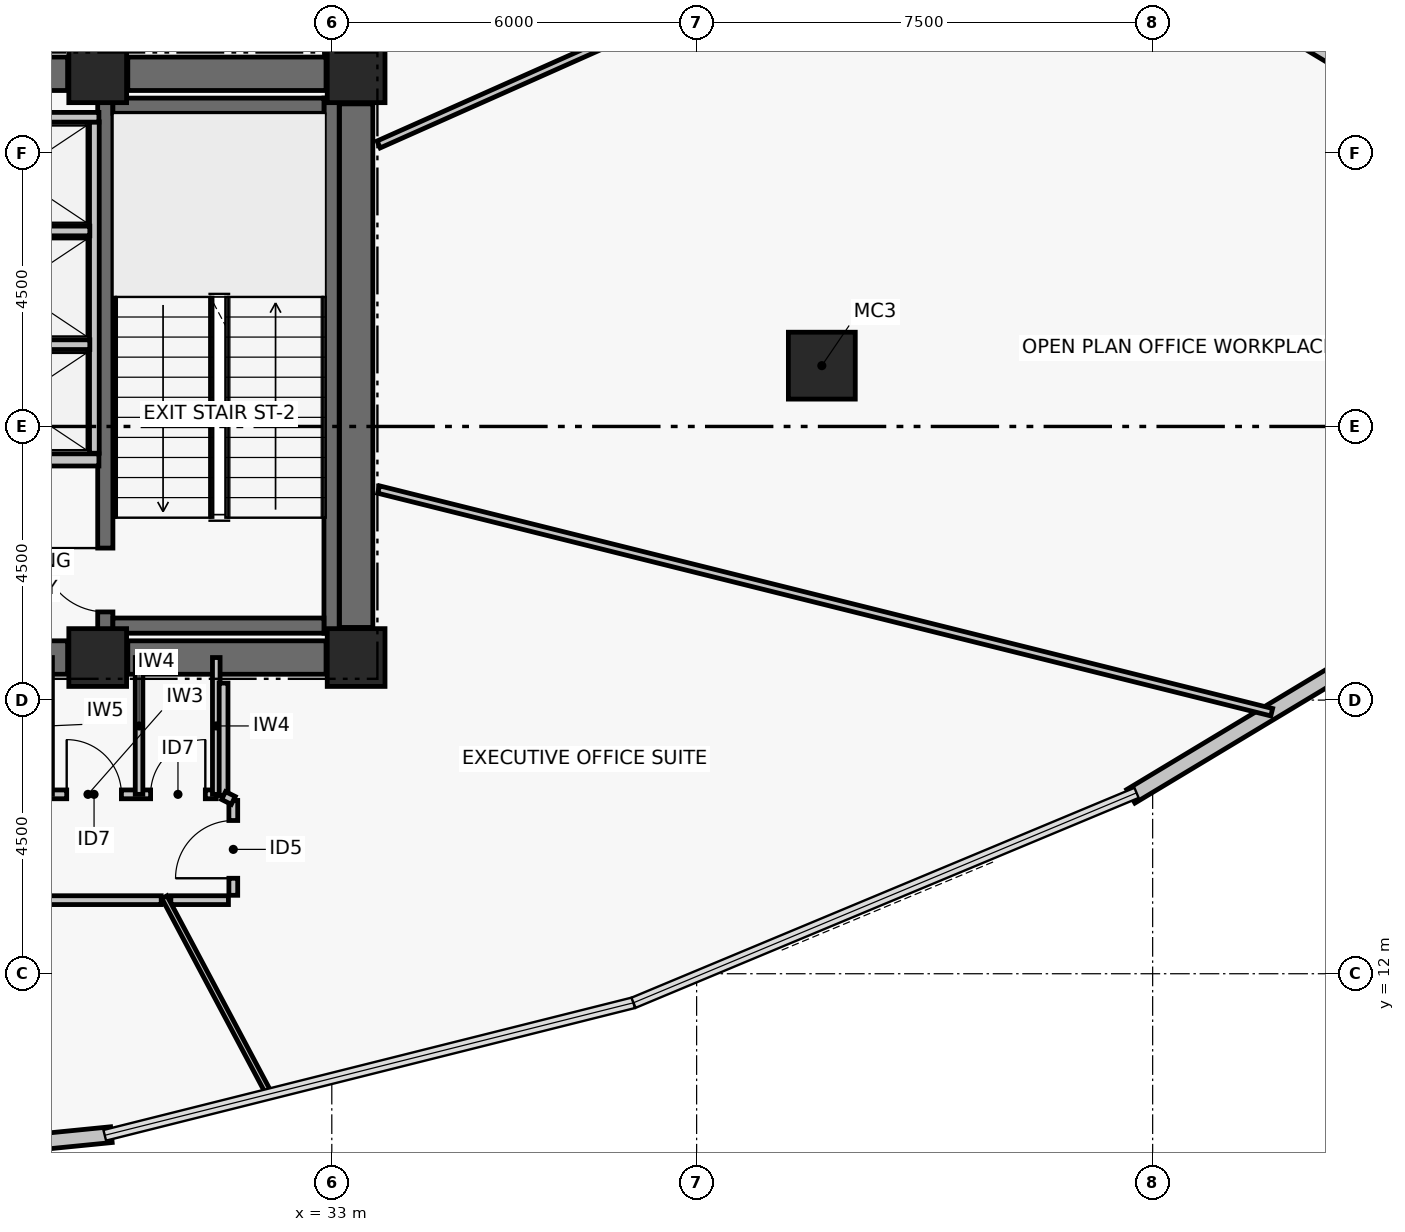
"""IFC4 building model, lengths in metres.
Left out: names, types, materials, properties, quantities, classifications, styles, units other than length and angle.
Written with IfcOpenShell. Run it as: python <this file> out.ifc"""

import sys

from ifc_helpers import new_model, si_unit, direction, frame, frame_2d, origin, origin_2d, place, context, subcontext, project, spatial, rectangle, hollow_rectangle, extrude, element, fill, save


model = new_model("IFC4")
c1 = context("Model", 3, precision=1e-05, world=origin(), true_north=direction((0.0, 1.0)))
c2 = subcontext(c1, "Body", "Model", "MODEL_VIEW")
j1 = project(units=[si_unit("LENGTHUNIT", "METRE"), si_unit("PLANEANGLEUNIT", "RADIAN")], contexts=[c1])
p1 = place(None, origin())
s1 = spatial("IfcSite", under=j1, at=p1, CompositionType="ELEMENT")
p2 = place(p1, origin())
s2 = spatial("IfcBuilding", under=s1, at=p2, CompositionType="ELEMENT")
p3 = place(p2, frame((0.0, 0.0, 158.04)))
s3 = spatial("IfcBuildingStorey", under=s2, at=p3, CompositionType="ELEMENT", Elevation=158.04)
for number, where, z_axis, x_axis in (
    (1, (29.15, 17.2, 0.0), (0.0, 0.0, 1.0), (1.0, 0.0, 0.0)),
    (2, (33.4, 17.2, 0.0), (0.0, 0.0, 1.0), (1.0, 0.0, 0.0)),
    (3, (29.15, 26.8, 0.0), (0.0, 0.0, 1.0), (1.0, 0.0, 0.0)),
    (4, (33.4, 26.8, 0.0), (0.0, 0.0, 1.0), (1.0, 0.0, 0.0)),
):
    element("IfcColumn", number, at=place(p3, frame(where, z_axis=z_axis, x_axis=x_axis)), inside=s3, PredefinedType="COLUMN", context=c2, shape_type="SweptSolid", body=[
        extrude(rectangle(XDim=0.95, YDim=0.95, at=origin_2d()), origin(), (0.0, 0.0, 1.0), 3.72),
    ])
p4 = place(p3, frame((26.85, 17.2, 0.0), z_axis=(0.0, 0.0, 1.0), x_axis=(1.0, 0.0, 0.0)))
e5 = element("IfcWall", 5, at=p4, inside=s3, PredefinedType="SHEAR", context=c2, shape_type="SweptSolid", body=[
    extrude(rectangle(XDim=1.805, YDim=0.55, at=frame_2d((0.902, 0.0))), origin(), (0.0, 0.0, 1.0), 3.5),
])
p5 = place(p3, frame((29.645, 17.2, 0.0), z_axis=(0.0, 0.0, 1.0), x_axis=(1.0, 0.0, 0.0)))
e6 = element("IfcWall", 6, at=p5, inside=s3, PredefinedType="SHEAR", context=c2, shape_type="SweptSolid", body=[
    extrude(rectangle(XDim=3.26, YDim=0.55, at=frame_2d((1.63, 0.0))), origin(), (0.0, 0.0, 1.0), 3.5),
])
p6 = place(p3, frame((26.85, 26.8, 0.0), z_axis=(0.0, 0.0, 1.0), x_axis=(1.0, 0.0, 0.0)))
e7 = element("IfcWall", 7, at=p6, inside=s3, PredefinedType="SHEAR", context=c2, shape_type="SweptSolid", body=[
    extrude(rectangle(XDim=1.805, YDim=0.55, at=frame_2d((0.902, 0.0))), origin(), (0.0, 0.0, 1.0), 3.5),
])
p7 = place(p3, frame((29.645, 26.8, 0.0), z_axis=(0.0, 0.0, 1.0), x_axis=(1.0, 0.0, 0.0)))
e8 = element("IfcWall", 8, at=p7, inside=s3, PredefinedType="SHEAR", context=c2, shape_type="SweptSolid", body=[
    extrude(rectangle(XDim=3.26, YDim=0.55, at=frame_2d((1.63, 0.0))), origin(), (0.0, 0.0, 1.0), 3.5),
])
p8 = place(p3, frame((33.4, 17.695, 0.0), z_axis=(0.0, 0.0, 1.0), x_axis=(0.0, 1.0, 0.0)))
e9 = element("IfcWall", 9, at=p8, inside=s3, PredefinedType="SHEAR", context=c2, shape_type="SweptSolid", body=[
    extrude(rectangle(XDim=8.61, YDim=0.55, at=frame_2d((4.305, 0.0))), origin(), (0.0, 0.0, 1.0), 3.5),
])
p9 = place(p3, frame((29.275, 17.6, 0.0), z_axis=(0.0, 0.0, 1.0), x_axis=(0.0, 1.0, 0.0)))
e10 = element("IfcWall", 10, at=p9, inside=s3, PredefinedType="SHEAR", context=c2, shape_type="SweptSolid", body=[
    extrude(rectangle(XDim=8.8, YDim=0.25, at=frame_2d((4.4, 0.0))), origin(), (0.0, 0.0, 1.0), 3.5),
])
p10 = place(p9, frame((0.35, 0.0, 0.0)))
e11 = element("IfcOpeningElement", 11, at=p10, cuts=e10, PredefinedType="OPENING", context=c2, shape_type="SweptSolid", body=[
    extrude(rectangle(XDim=1.05, YDim=2.08, at=frame_2d((0.525, 1.04))), frame((0.0, 0.135, 0.0), z_axis=(0.0, -1.0, 0.0), x_axis=(1.0, 0.0, 0.0)), (0.0, 0.0, 1.0), 0.27),
])
p11 = place(p3, frame((32.996, 17.6, 0.0), z_axis=(0.0, 0.0, 1.0), x_axis=(0.0, 1.0, 0.0)))
e12 = element("IfcWall", 12, at=p11, inside=s3, PredefinedType="SHEAR", context=c2, shape_type="SweptSolid", body=[
    extrude(rectangle(XDim=8.8, YDim=0.25, at=frame_2d((4.4, 0.0))), origin(), (0.0, 0.0, 1.0), 3.5),
])
for number, where, z_axis, x_axis in (
    (13, (29.4, 17.725, 0.0), (0.0, 0.0, 1.0), (1.0, 0.0, 0.0)),
    (14, (29.4, 26.275, 0.0), (0.0, 0.0, 1.0), (1.0, 0.0, 0.0)),
):
    element("IfcWall", number, at=place(p3, frame(where, z_axis=z_axis, x_axis=x_axis)), inside=s3, PredefinedType="SHEAR", context=c2, shape_type="SweptSolid", body=[
        extrude(rectangle(XDim=3.471, YDim=0.25, at=frame_2d((1.736, 0.0))), origin(), (0.0, 0.0, 1.0), 3.5),
    ])
p12 = place(p3, frame((41.059, 22.0, 0.0), z_axis=(0.0, 0.0, 1.0), x_axis=(1.0, 0.0, 0.0)))
e15 = element("IfcColumn", 15, at=p12, inside=s3, PredefinedType="COLUMN", context=c2, shape_type="SweptSolid", body=[
    extrude(hollow_rectangle(XDim=1.1, YDim=1.1, WallThickness=0.045, at=origin_2d()), origin(), (0.0, 0.0, 1.0), 3.72),
])
p13 = place(p3, frame((46.141, 29.082, 0.0), z_axis=(0.0, 0.0, 1.0), x_axis=(0.856788694159, -0.515667658053, 0.0)))
e16 = element("IfcWall", 16, at=p13, inside=s3, PredefinedType="PARTITIONING", context=c2, shape_type="SweptSolid", body=[
    extrude(rectangle(XDim=9.279, YDim=0.26, at=frame_2d((4.64, 0.0))), origin(), (0.0, 0.0, 1.0), 3.5),
])
p14 = place(p3, frame((29.375, 9.354, 0.0), z_axis=(0.0, 0.0, 1.0), x_axis=(-0.9950896707, -0.098977508888, 0.0)))
e17 = element("IfcWall", 17, at=p14, inside=s3, PredefinedType="PARTITIONING", context=c2, shape_type="SweptSolid", body=[
    extrude(rectangle(XDim=9.28, YDim=0.26, at=frame_2d((4.64, 0.0))), origin(), (0.0, 0.0, 1.0), 3.5),
])
p15 = place(p3, frame((54.091, 19.703, 0.0), z_axis=(0.0, 0.0, 1.0), x_axis=(-0.856788694159, -0.515667658053, 0.0)))
e18 = element("IfcWall", 18, at=p15, inside=s3, PredefinedType="PARTITIONING", context=c2, shape_type="SweptSolid", body=[
    extrude(rectangle(XDim=9.279, YDim=0.26, at=frame_2d((4.64, 0.0))), origin(), (0.0, 0.0, 1.0), 3.5),
])
p16 = place(p3, frame((26.37, 20.45, 0.0), z_axis=(0.0, 0.0, 1.0), x_axis=(1.0, 0.0, 0.0)))
e19 = element("IfcWall", 19, at=p16, inside=s3, PredefinedType="PARTITIONING", context=c2, shape_type="SweptSolid", body=[
    extrude(rectangle(XDim=2.8, YDim=0.2, at=frame_2d((1.4, 0.0))), origin(), (0.0, 0.0, 1.0), 3.5),
])
p17 = place(p16, frame((0.78, 0.0, 0.0)))
e20 = element("IfcOpeningElement", 20, at=p17, cuts=e19, PredefinedType="OPENING", context=c2, shape_type="SweptSolid", body=[
    extrude(rectangle(XDim=1.1, YDim=2.08, at=frame_2d((0.55, 1.04))), frame((0.0, 0.11, 0.0), z_axis=(0.0, -1.0, 0.0), x_axis=(1.0, 0.0, 0.0)), (0.0, 0.0, 1.0), 0.22),
])
p18 = place(p3, frame((29.095, 20.56, 0.0), z_axis=(0.0, 0.0, 1.0), x_axis=(0.0, 1.0, 0.0)))
e21 = element("IfcWall", 21, at=p18, inside=s3, PredefinedType="PARTITIONING", context=c2, shape_type="SweptSolid", body=[
    extrude(rectangle(XDim=5.45, YDim=0.16, at=frame_2d((2.725, 0.0))), origin(), (0.0, 0.0, 1.0), 3.5),
])
p19 = place(p3, frame((26.37, 22.345, 0.0), z_axis=(0.0, 0.0, 1.0), x_axis=(1.0, 0.0, 0.0)))
e22 = element("IfcWall", 22, at=p19, inside=s3, PredefinedType="PARTITIONING", context=c2, shape_type="SweptSolid", body=[
    extrude(rectangle(XDim=2.65, YDim=0.16, at=frame_2d((1.325, 0.0))), origin(), (0.0, 0.0, 1.0), 3.5),
])
p20 = place(p3, frame((26.53, 24.215, 0.0), z_axis=(0.0, 0.0, 1.0), x_axis=(1.0, 0.0, 0.0)))
e23 = element("IfcWall", 23, at=p20, inside=s3, PredefinedType="PARTITIONING", context=c2, shape_type="SweptSolid", body=[
    extrude(rectangle(XDim=2.49, YDim=0.16, at=frame_2d((1.245, 0.0))), origin(), (0.0, 0.0, 1.0), 3.5),
])
p21 = place(p3, frame((26.34, 26.085, 0.0), z_axis=(0.0, 0.0, 1.0), x_axis=(1.0, 0.0, 0.0)))
e24 = element("IfcWall", 24, at=p21, inside=s3, PredefinedType="PARTITIONING", context=c2, shape_type="SweptSolid", body=[
    extrude(rectangle(XDim=2.83, YDim=0.16, at=frame_2d((1.415, 0.0))), origin(), (0.0, 0.0, 1.0), 3.5),
])
p22 = place(p3, frame((26.88, 14.95, 0.0), z_axis=(0.0, 0.0, 1.0), x_axis=(1.0, 0.0, 0.0)))
e25 = element("IfcWall", 25, at=p22, inside=s3, PredefinedType="PARTITIONING", context=c2, shape_type="SweptSolid", body=[
    extrude(rectangle(XDim=4.22, YDim=0.145, at=frame_2d((2.11, 0.0))), origin(), (0.0, 0.0, 1.0), 2.93),
])
p23 = place(p22, frame((0.28, 0.0, 0.0)))
e26 = element("IfcOpeningElement", 26, at=p23, cuts=e25, PredefinedType="OPENING", context=c2, shape_type="SweptSolid", body=[
    extrude(rectangle(XDim=0.9, YDim=2.02, at=frame_2d((0.45, 1.01))), frame((0.0, 0.083, 0.0), z_axis=(0.0, -1.0, 0.0), x_axis=(1.0, 0.0, 0.0)), (0.0, 0.0, 1.0), 0.165),
])
p24 = place(p22, frame((1.76, 0.0, 0.0)))
e27 = element("IfcOpeningElement", 27, at=p24, cuts=e25, PredefinedType="OPENING", context=c2, shape_type="SweptSolid", body=[
    extrude(rectangle(XDim=0.9, YDim=2.02, at=frame_2d((0.45, 1.01))), frame((0.0, 0.083, 0.0), z_axis=(0.0, -1.0, 0.0), x_axis=(1.0, 0.0, 0.0)), (0.0, 0.0, 1.0), 0.165),
])
p25 = place(p22, frame((3.14, 0.0, 0.0)))
e28 = element("IfcOpeningElement", 28, at=p25, cuts=e25, PredefinedType="OPENING", context=c2, shape_type="SweptSolid", body=[
    extrude(rectangle(XDim=0.9, YDim=2.02, at=frame_2d((0.45, 1.01))), frame((0.0, 0.083, 0.0), z_axis=(0.0, -1.0, 0.0), x_axis=(1.0, 0.0, 0.0)), (0.0, 0.0, 1.0), 0.165),
])
p26 = place(p3, frame((28.35, 14.95, 0.0), z_axis=(0.0, 0.0, 1.0), x_axis=(0.0, 1.0, 0.0)))
e29 = element("IfcWall", 29, at=p26, inside=s3, PredefinedType="PARTITIONING", context=c2, shape_type="SweptSolid", body=[
    extrude(rectangle(XDim=2.25, YDim=0.11, at=frame_2d((1.125, 0.0))), origin(), (0.0, 0.0, 1.0), 2.63),
])
for number, where, z_axis, x_axis in (
    (30, (29.83, 14.95, 0.0), (0.0, 0.0, 1.0), (0.0, 1.0, 0.0)),
    (31, (31.1, 14.95, 0.0), (0.0, 0.0, 1.0), (0.0, 1.0, 0.0)),
):
    element("IfcWall", number, at=place(p3, frame(where, z_axis=z_axis, x_axis=x_axis)), inside=s3, PredefinedType="PARTITIONING", context=c2, shape_type="SweptSolid", body=[
        extrude(rectangle(XDim=2.25, YDim=0.125, at=frame_2d((1.125, 0.0))), origin(), (0.0, 0.0, 1.0), 2.63),
    ])
p27 = place(p3, frame((21.006, 13.21, 0.0), z_axis=(0.0, 0.0, 1.0), x_axis=(1.0, 0.0, 0.0)))
e32 = element("IfcWall", 32, at=p27, inside=s3, PredefinedType="PARTITIONING", context=c2, shape_type="SweptSolid", body=[
    extrude(rectangle(XDim=9.189, YDim=0.145, at=frame_2d((4.594, 0.0))), origin(), (0.0, 0.0, 1.0), 2.73),
])
p28 = place(p27, frame((5.098, 0.0, 0.0)))
e33 = element("IfcOpeningElement", 33, at=p28, cuts=e32, PredefinedType="OPENING", context=c2, shape_type="SweptSolid", body=[
    extrude(rectangle(XDim=0.92, YDim=2.05, at=frame_2d((0.46, 1.025))), frame((0.0, 0.083, 0.0), z_axis=(0.0, -1.0, 0.0), x_axis=(1.0, 0.0, 0.0)), (0.0, 0.0, 1.0), 0.165),
])
p29 = place(p3, frame((30.353, 13.21, 0.0), z_axis=(0.0, 0.0, 1.0), x_axis=(1.0, 0.0, 0.0)))
e34 = element("IfcWall", 34, at=p29, inside=s3, PredefinedType="PARTITIONING", context=c2, shape_type="SweptSolid", body=[
    extrude(rectangle(XDim=0.947, YDim=0.145, at=frame_2d((0.474, 0.0))), origin(), (0.0, 0.0, 1.0), 3.5),
])
p30 = place(p3, frame((31.38, 13.29, 0.0), z_axis=(0.0, 0.0, 1.0), x_axis=(0.0, 1.0, 0.0)))
e35 = element("IfcWall", 35, at=p30, inside=s3, PredefinedType="PARTITIONING", context=c2, shape_type="SweptSolid", body=[
    extrude(rectangle(XDim=1.56, YDim=0.145, at=frame_2d((0.78, 0.0))), origin(), (0.0, 0.0, 1.0), 3.5),
])
p31 = place(p30, frame((0.28, 0.0, 0.0)))
e36 = element("IfcOpeningElement", 36, at=p31, cuts=e35, PredefinedType="OPENING", context=c2, shape_type="SweptSolid", body=[
    extrude(rectangle(XDim=0.95, YDim=2.06, at=frame_2d((0.475, 1.03))), frame((0.0, 0.083, 0.0), z_axis=(0.0, -1.0, 0.0), x_axis=(1.0, 0.0, 0.0)), (0.0, 0.0, 1.0), 0.165),
])
p32 = place(p3, frame((31.22, 14.93, 0.0), z_axis=(0.0, 0.0, 1.0), x_axis=(0.0, 1.0, 0.0)))
e37 = element("IfcWall", 37, at=p32, inside=s3, PredefinedType="PARTITIONING", context=c2, shape_type="SweptSolid", body=[
    extrude(rectangle(XDim=1.85, YDim=0.145, at=frame_2d((0.925, 0.0))), origin(), (0.0, 0.0, 1.0), 2.63),
])
p33 = place(p3, frame((33.74, 27.22, 0.0), z_axis=(0.0, 0.0, 1.0), x_axis=(-1.0, 0.0, 0.0)))
e38 = element("IfcWall", 38, at=p33, inside=s3, PredefinedType="PARTITIONING", context=c2, shape_type="SweptSolid", body=[
    extrude(rectangle(XDim=0.86, YDim=0.145, at=frame_2d((0.43, 0.0))), origin(), (0.0, 0.0, 1.0), 2.63),
])
p34 = place(p3, frame((33.77, 25.637, 0.0), z_axis=(0.0, 0.0, 1.0), x_axis=(0.913542006179, 0.406744395102, 0.0)))
e39 = element("IfcWall", 39, at=p34, inside=s3, PredefinedType="PARTITIONING", context=c2, shape_type="SweptSolid", body=[
    extrude(rectangle(XDim=10.915, YDim=0.125, at=frame_2d((5.457, 0.0))), origin(), (0.0, 0.0, 1.0), 2.63),
])
p35 = place(p34, frame((6.177, 0.0, 0.0)))
e40 = element("IfcOpeningElement", 40, at=p35, cuts=e39, PredefinedType="OPENING", context=c2, shape_type="SweptSolid", body=[
    extrude(rectangle(XDim=0.92, YDim=2.05, at=frame_2d((0.46, 1.025))), frame((0.0, 0.073, 0.0), z_axis=(0.0, -1.0, 0.0), x_axis=(1.0, 0.0, 0.0)), (0.0, 0.0, 1.0), 0.145),
])
p36 = place(p3, frame((30.247, 13.26, 0.0), z_axis=(0.0, 0.0, 1.0), x_axis=(0.469475406562, -0.882945549076, 0.0)))
e41 = element("IfcWall", 41, at=p36, inside=s3, PredefinedType="PARTITIONING", context=c2, shape_type="SweptSolid", body=[
    extrude(rectangle(XDim=3.679, YDim=0.095, at=frame_2d((1.84, 0.0))), origin(), (0.0, 0.0, 1.0), 3.5),
])
p37 = place(p3, frame((33.77, 19.963, 0.0), z_axis=(0.0, 0.0, 1.0), x_axis=(0.970295996232, -0.241920812863, 0.0)))
e42 = element("IfcWall", 42, at=p37, inside=s3, PredefinedType="PARTITIONING", context=c2, shape_type="SweptSolid", body=[
    extrude(rectangle(XDim=15.138, YDim=0.125, at=frame_2d((7.569, 0.0))), origin(), (0.0, 0.0, 1.0), 2.63),
])
p38 = place(p3, frame((31.38, 14.85, 0.0), z_axis=(0.0, 0.0, 1.0), x_axis=(-0.89470021502, 0.446667130247, 0.0)))
e43 = element("IfcWall", 43, at=p38, inside=s3, PredefinedType="PARTITIONING", context=c2, shape_type="SweptSolid", body=[
    extrude(rectangle(XDim=0.179, YDim=0.145, at=frame_2d((0.089, 0.0))), origin(), (0.0, 0.0, 1.0), 3.5),
])
p39 = place(p10, origin())
e44 = element("IfcDoor", 44, at=p39, inside=s3, OperationType="SINGLE_SWING_RIGHT", PredefinedType="DOOR", context=c2, shape_type="SweptSolid", body=[
    extrude(rectangle(XDim=1.05, YDim=2.08, at=frame_2d((0.525, 1.04))), frame((0.0, 0.025, 0.0), z_axis=(0.0, -1.0, 0.0), x_axis=(1.0, 0.0, 0.0)), (0.0, 0.0, 1.0), 0.05),
])
fill(e11, e44)
p40 = place(p24, origin())
e45 = element("IfcDoor", 45, at=p40, inside=s3, OperationType="SINGLE_SWING_LEFT", PredefinedType="DOOR", context=c2, shape_type="SweptSolid", body=[
    extrude(rectangle(XDim=0.9, YDim=2.02, at=frame_2d((0.45, 1.01))), frame((0.0, 0.025, 0.0), z_axis=(0.0, -1.0, 0.0), x_axis=(1.0, 0.0, 0.0)), (0.0, 0.0, 1.0), 0.05),
])
fill(e27, e45)
p41 = place(p25, origin())
e46 = element("IfcDoor", 46, at=p41, inside=s3, OperationType="SINGLE_SWING_RIGHT", PredefinedType="DOOR", context=c2, shape_type="SweptSolid", body=[
    extrude(rectangle(XDim=0.9, YDim=2.02, at=frame_2d((0.45, 1.01))), frame((0.0, 0.025, 0.0), z_axis=(0.0, -1.0, 0.0), x_axis=(1.0, 0.0, 0.0)), (0.0, 0.0, 1.0), 0.05),
])
fill(e28, e46)
p42 = place(p31, origin())
e47 = element("IfcDoor", 47, at=p42, inside=s3, OperationType="SINGLE_SWING_LEFT", PredefinedType="DOOR", context=c2, shape_type="SweptSolid", body=[
    extrude(rectangle(XDim=0.95, YDim=2.06, at=frame_2d((0.475, 1.03))), frame((0.0, 0.025, 0.0), z_axis=(0.0, -1.0, 0.0), x_axis=(1.0, 0.0, 0.0)), (0.0, 0.0, 1.0), 0.05),
])
fill(e36, e47)
save(model, sys.argv[1])
